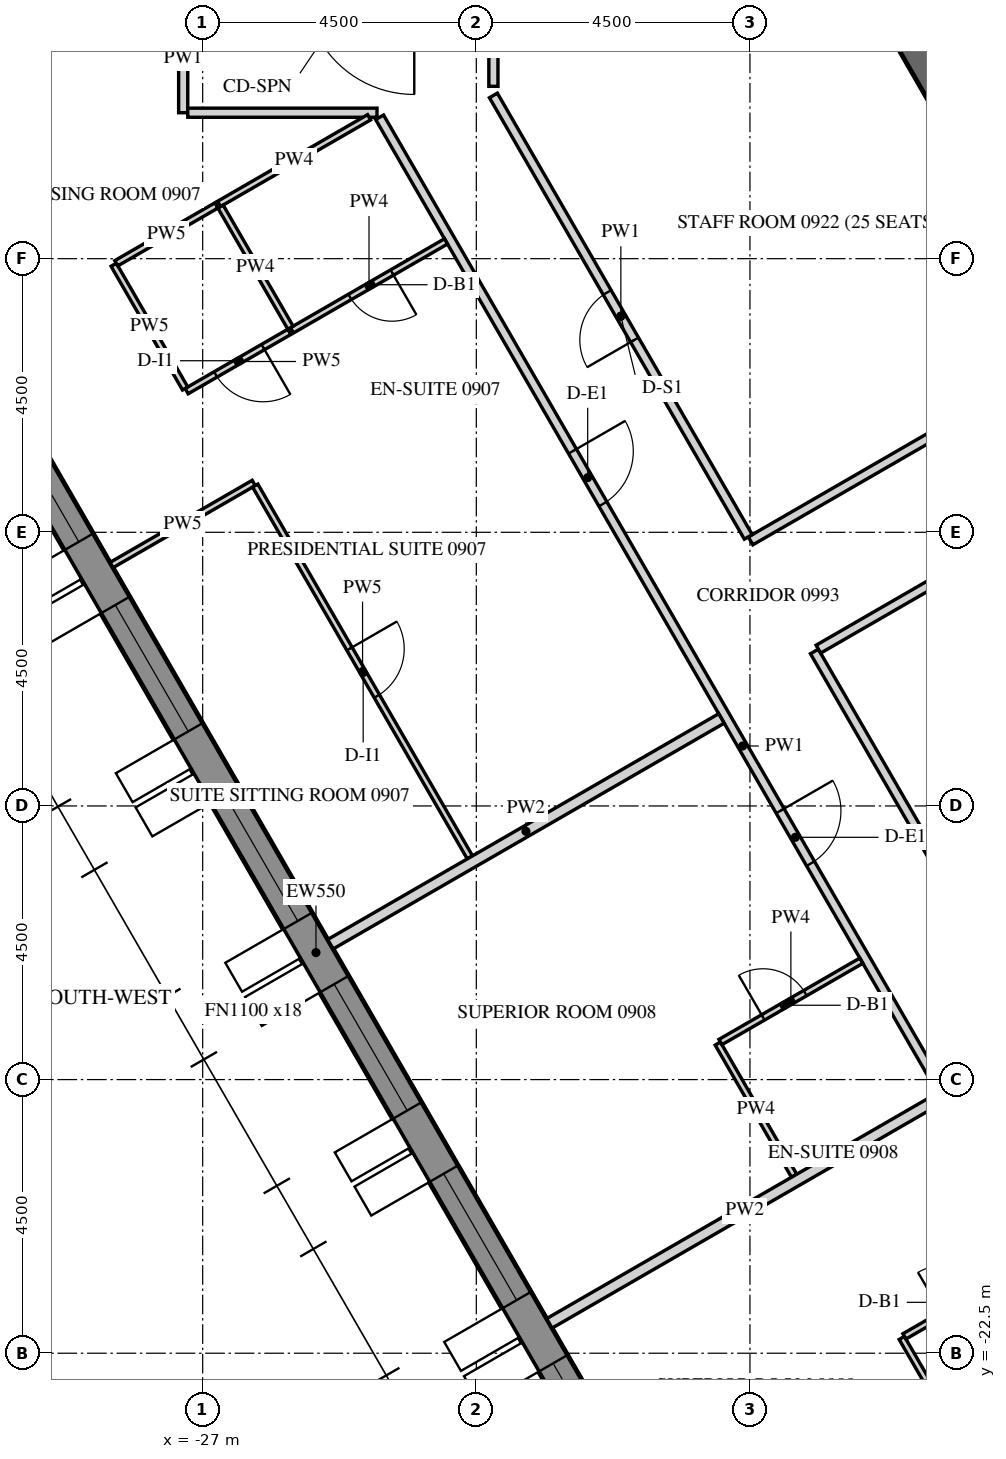
"""IFC4 building model, lengths in metres.
Left out: names, types, materials, properties, quantities, classifications, styles, units other than length and angle.
Written with IfcOpenShell. Run it as: python <this file> out.ifc"""

import sys

from ifc_helpers import new_model, si_unit, direction, frame, frame_2d, origin, place, context, subcontext, project, spatial, polyline, rectangle, outline, extrude, element, fill, save


model = new_model("IFC4")
c1 = context("Model", 3, precision=1e-05, world=origin(), true_north=direction((0.0, 1.0)))
c2 = subcontext(c1, "Body", "Model", "MODEL_VIEW")
j1 = project(units=[si_unit("LENGTHUNIT", "METRE"), si_unit("PLANEANGLEUNIT", "RADIAN")], contexts=[c1])
p1 = place(None, origin())
s1 = spatial("IfcSite", under=j1, at=p1, CompositionType="ELEMENT")
p2 = place(p1, origin())
s2 = spatial("IfcBuilding", under=s1, at=p2, CompositionType="ELEMENT")
p3 = place(p2, frame((0.0, 0.0, 123.3)))
s3 = spatial("IfcBuildingStorey", under=s2, at=p3, CompositionType="ELEMENT", Elevation=123.3)
p4 = place(p3, frame((-32.655, -2.89, -0.15), z_axis=(0.0, 0.0, 1.0), x_axis=(0.499997711317, -0.866026725152, 0.0)))
e1 = element("IfcWall", 1, at=p4, inside=s3, PredefinedType="SOLIDWALL", context=c2, shape_type="SweptSolid", body=[
    extrude(outline(polyline([(-0.022, -0.275), (30.097, -0.275), (30.045, 0.275), (0.022, 0.275), (-0.022, -0.275)])), origin(), (0.0, 0.0, 1.0), 3.9),
])
p5 = place(p4, frame((1.236, 0.0, 1.05)))
e2 = element("IfcOpeningElement", 2, at=p5, cuts=e1, PredefinedType="OPENING", context=c2, shape_type="SweptSolid", body=[
    extrude(rectangle(XDim=2.4, YDim=2.4, at=frame_2d((1.2, 1.2))), frame((0.0, 0.285, 0.0), z_axis=(0.0, -1.0, 0.0), x_axis=(1.0, 0.0, 0.0)), (0.0, 0.0, 1.0), 0.57),
])
p6 = place(p4, frame((4.835, 0.0, 1.05)))
e3 = element("IfcOpeningElement", 3, at=p6, cuts=e1, PredefinedType="OPENING", context=c2, shape_type="SweptSolid", body=[
    extrude(rectangle(XDim=2.4, YDim=2.4, at=frame_2d((1.2, 1.2))), frame((0.0, 0.285, 0.0), z_axis=(0.0, -1.0, 0.0), x_axis=(1.0, 0.0, 0.0)), (0.0, 0.0, 1.0), 0.57),
])
p7 = place(p4, frame((8.436, 0.0, 1.05)))
e4 = element("IfcOpeningElement", 4, at=p7, cuts=e1, PredefinedType="OPENING", context=c2, shape_type="SweptSolid", body=[
    extrude(rectangle(XDim=2.4, YDim=2.4, at=frame_2d((1.2, 1.2))), frame((0.0, 0.285, 0.0), z_axis=(0.0, -1.0, 0.0), x_axis=(1.0, 0.0, 0.0)), (0.0, 0.0, 1.0), 0.57),
])
p8 = place(p4, frame((12.035, 0.0, 1.05)))
e5 = element("IfcOpeningElement", 5, at=p8, cuts=e1, PredefinedType="OPENING", context=c2, shape_type="SweptSolid", body=[
    extrude(rectangle(XDim=2.4, YDim=2.4, at=frame_2d((1.2, 1.2))), frame((0.0, 0.285, 0.0), z_axis=(0.0, -1.0, 0.0), x_axis=(1.0, 0.0, 0.0)), (0.0, 0.0, 1.0), 0.57),
])
p9 = place(p4, frame((15.635, 0.0, 1.05)))
e6 = element("IfcOpeningElement", 6, at=p9, cuts=e1, PredefinedType="OPENING", context=c2, shape_type="SweptSolid", body=[
    extrude(rectangle(XDim=2.4, YDim=2.4, at=frame_2d((1.2, 1.2))), frame((0.0, 0.285, 0.0), z_axis=(0.0, -1.0, 0.0), x_axis=(1.0, 0.0, 0.0)), (0.0, 0.0, 1.0), 0.57),
])
p10 = place(p4, frame((19.236, 0.0, 1.05)))
e7 = element("IfcOpeningElement", 7, at=p10, cuts=e1, PredefinedType="OPENING", context=c2, shape_type="SweptSolid", body=[
    extrude(rectangle(XDim=2.4, YDim=2.4, at=frame_2d((1.2, 1.2))), frame((0.0, 0.285, 0.0), z_axis=(0.0, -1.0, 0.0), x_axis=(1.0, 0.0, 0.0)), (0.0, 0.0, 1.0), 0.57),
])
p11 = place(p4, frame((22.835, 0.0, 1.05)))
e8 = element("IfcOpeningElement", 8, at=p11, cuts=e1, PredefinedType="OPENING", context=c2, shape_type="SweptSolid", body=[
    extrude(rectangle(XDim=2.4, YDim=2.4, at=frame_2d((1.2, 1.2))), frame((0.0, 0.285, 0.0), z_axis=(0.0, -1.0, 0.0), x_axis=(1.0, 0.0, 0.0)), (0.0, 0.0, 1.0), 0.57),
])
p12 = place(p4, frame((26.436, 0.0, 1.05)))
e9 = element("IfcOpeningElement", 9, at=p12, cuts=e1, PredefinedType="OPENING", context=c2, shape_type="SweptSolid", body=[
    extrude(rectangle(XDim=2.4, YDim=2.4, at=frame_2d((1.2, 1.2))), frame((0.0, 0.285, 0.0), z_axis=(0.0, -1.0, 0.0), x_axis=(1.0, 0.0, 0.0)), (0.0, 0.0, 1.0), 0.57),
])
p13 = place(p3, frame((-15.819, 0.0, -0.15), z_axis=(0.0, 0.0, 1.0), x_axis=(0.499999880136, -0.866025472988, 0.0)))
e10 = element("IfcWall", 10, at=p13, inside=s3, PredefinedType="SHEAR", context=c2, shape_type="SweptSolid", body=[
    extrude(outline(polyline([(-0.173, -0.3), (15.993, -0.3), (15.646, 0.3), (0.173, 0.3), (-0.173, -0.3)])), origin(), (0.0, 0.0, 1.0), 3.9),
])
p14 = place(p13, frame((6.981, 0.0, 0.15)))
e11 = element("IfcOpeningElement", 11, at=p14, cuts=e10, PredefinedType="OPENING", context=c2, shape_type="SweptSolid", body=[
    extrude(rectangle(XDim=1.8, YDim=2.4, at=frame_2d((0.9, 1.2))), frame((0.0, 0.31, 0.0), z_axis=(0.0, -1.0, 0.0), x_axis=(1.0, 0.0, 0.0)), (0.0, 0.0, 1.0), 0.62),
])
p15 = place(p3, frame((-27.32, -0.3, 0.0), z_axis=(0.0, 0.0, 1.0), x_axis=(0.0, -1.0, 0.0)))
e12 = element("IfcWall", 12, at=p15, inside=s3, PredefinedType="PARTITIONING", context=c2, shape_type="SweptSolid", body=[
    extrude(rectangle(XDim=1.8, YDim=0.15, at=frame_2d((0.9, 0.0))), origin(), (0.0, 0.0, 1.0), 2.988),
])
p16 = place(p3, frame((-27.245, -2.1, 0.0), z_axis=(0.0, 0.0, 1.0), x_axis=(1.0, 0.0, 0.0)))
e13 = element("IfcWall", 13, at=p16, inside=s3, PredefinedType="PARTITIONING", context=c2, shape_type="SweptSolid", body=[
    extrude(rectangle(XDim=3.112, YDim=0.15, at=frame_2d((1.556, 0.0))), origin(), (0.0, 0.0, 1.0), 2.988),
])
p17 = place(p3, frame((-24.09, -2.175, 0.0), z_axis=(0.0, 0.0, 1.0), x_axis=(0.499996832073, -0.86602723278, 0.0)))
e14 = element("IfcWall", 14, at=p17, inside=s3, PredefinedType="PARTITIONING", context=c2, shape_type="SweptSolid", body=[
    extrude(rectangle(XDim=23.877, YDim=0.15, at=frame_2d((11.938, 0.0))), origin(), (0.0, 0.0, 1.0), 2.988),
])
p18 = place(p17, frame((6.343, 0.0, 0.0)))
e15 = element("IfcOpeningElement", 15, at=p18, cuts=e14, PredefinedType="OPENING", context=c2, shape_type="SweptSolid", body=[
    extrude(rectangle(XDim=1.0, YDim=2.1, at=frame_2d((0.5, 1.05))), frame((0.0, 0.085, 0.0), z_axis=(0.0, -1.0, 0.0), x_axis=(1.0, 0.0, 0.0)), (0.0, 0.0, 1.0), 0.17),
])
p19 = place(p17, frame((13.172, 0.0, 0.0)))
e16 = element("IfcOpeningElement", 16, at=p19, cuts=e14, PredefinedType="OPENING", context=c2, shape_type="SweptSolid", body=[
    extrude(rectangle(XDim=1.0, YDim=2.1, at=frame_2d((0.5, 1.05))), frame((0.0, 0.085, 0.0), z_axis=(0.0, -1.0, 0.0), x_axis=(1.0, 0.0, 0.0)), (0.0, 0.0, 1.0), 0.17),
])
p20 = place(p17, frame((19.625, 0.0, 0.0)))
e17 = element("IfcOpeningElement", 17, at=p20, cuts=e14, PredefinedType="OPENING", context=c2, shape_type="SweptSolid", body=[
    extrude(rectangle(XDim=1.0, YDim=2.1, at=frame_2d((0.5, 1.05))), frame((0.0, 0.085, 0.0), z_axis=(0.0, -1.0, 0.0), x_axis=(1.0, 0.0, 0.0)), (0.0, 0.0, 1.0), 0.17),
])
p21 = place(p3, frame((-12.664, -6.066, 0.0), z_axis=(0.0, 0.0, 1.0), x_axis=(-0.866023618125, -0.500003092839, 0.0)))
e18 = element("IfcWall", 18, at=p21, inside=s3, PredefinedType="PARTITIONING", context=c2, shape_type="SweptSolid", body=[
    extrude(rectangle(XDim=6.15, YDim=0.15, at=frame_2d((3.075, 0.0))), origin(), (0.0, 0.0, 1.0), 2.988),
])
p22 = place(p3, frame((-18.027, -9.076, 0.0), z_axis=(0.0, 0.0, 1.0), x_axis=(-0.500007318041, 0.86602117867, 0.0)))
e19 = element("IfcWall", 19, at=p22, inside=s3, PredefinedType="PARTITIONING", context=c2, shape_type="SweptSolid", body=[
    extrude(rectangle(XDim=8.383, YDim=0.15, at=frame_2d((4.191, 0.0))), origin(), (0.0, 0.0, 1.0), 2.988),
])
p23 = place(p22, frame((3.742, 0.0, 0.0)))
e20 = element("IfcOpeningElement", 20, at=p23, cuts=e19, PredefinedType="OPENING", context=c2, shape_type="SweptSolid", body=[
    extrude(rectangle(XDim=0.9, YDim=2.1, at=frame_2d((0.45, 1.05))), frame((0.0, 0.085, 0.0), z_axis=(0.0, -1.0, 0.0), x_axis=(1.0, 0.0, 0.0)), (0.0, 0.0, 1.0), 0.17),
])
p24 = place(p3, frame((-22.219, -1.666, 0.0), z_axis=(0.0, 0.0, 1.0), x_axis=(0.0, 1.0, 0.0)))
e21 = element("IfcWall", 21, at=p24, inside=s3, PredefinedType="PARTITIONING", context=c2, shape_type="SweptSolid", body=[
    extrude(rectangle(XDim=1.366, YDim=0.15, at=frame_2d((0.683, 0.0))), origin(), (0.0, 0.0, 1.0), 2.988),
])
p25 = place(p3, frame((-11.197, -20.907, 0.0), z_axis=(0.0, 0.0, 1.0), x_axis=(-0.500004557924, 0.86602277225, 0.0)))
e22 = element("IfcWall", 22, at=p25, inside=s3, PredefinedType="PARTITIONING", context=c2, shape_type="SweptSolid", body=[
    extrude(rectangle(XDim=11.487, YDim=0.15, at=frame_2d((5.743, 0.0))), origin(), (0.0, 0.0, 1.0), 2.988),
])
p26 = place(p25, frame((5.293, 0.0, 0.0)))
e23 = element("IfcOpeningElement", 23, at=p26, cuts=e22, PredefinedType="OPENING", context=c2, shape_type="SweptSolid", body=[
    extrude(rectangle(XDim=0.9, YDim=2.1, at=frame_2d((0.45, 1.05))), frame((0.0, 0.085, 0.0), z_axis=(0.0, -1.0, 0.0), x_axis=(1.0, 0.0, 0.0)), (0.0, 0.0, 1.0), 0.17),
])
p27 = place(p3, frame((-16.875, -10.922, 0.0), z_axis=(0.0, 0.0, 1.0), x_axis=(0.866023634079, 0.500003065207, 0.0)))
e24 = element("IfcWall", 24, at=p27, inside=s3, PredefinedType="PARTITIONING", context=c2, shape_type="SweptSolid", body=[
    extrude(rectangle(XDim=6.075, YDim=0.15, at=frame_2d((3.038, 0.0))), origin(), (0.0, 0.0, 1.0), 2.988),
])
p28 = place(p3, frame((-26.731, -3.6, 0.0), z_axis=(0.0, 0.0, 1.0), x_axis=(0.866004402611, 0.500036373335, 0.0)))
e25 = element("IfcWall", 25, at=p28, inside=s3, PredefinedType="PARTITIONING", context=c2, shape_type="SweptSolid", body=[
    extrude(rectangle(XDim=2.85, YDim=0.1, at=frame_2d((1.425, 0.0))), origin(), (0.0, 0.0, 1.0), 2.988),
])
p29 = place(p3, frame((-22.998, -4.216, 0.0), z_axis=(0.0, 0.0, 1.0), x_axis=(-0.866025730634, -0.499999433879, 0.0)))
e26 = element("IfcWall", 26, at=p29, inside=s3, PredefinedType="PARTITIONING", context=c2, shape_type="SweptSolid", body=[
    extrude(rectangle(XDim=2.925, YDim=0.1, at=frame_2d((1.462, 0.0))), origin(), (0.0, 0.0, 1.0), 2.988),
])
p30 = place(p29, frame((1.025, 0.0, 0.0)))
e27 = element("IfcOpeningElement", 27, at=p30, cuts=e26, PredefinedType="OPENING", context=c2, shape_type="SweptSolid", body=[
    extrude(rectangle(XDim=0.8, YDim=2.1, at=frame_2d((0.4, 1.05))), frame((0.0, 0.06, 0.0), z_axis=(0.0, -1.0, 0.0), x_axis=(1.0, 0.0, 0.0)), (0.0, 0.0, 1.0), 0.12),
])
p31 = place(p3, frame((-25.575, -5.703, 0.0), z_axis=(0.0, 0.0, 1.0), x_axis=(-0.866000020948, -0.500043961785, 0.0)))
e28 = element("IfcWall", 28, at=p31, inside=s3, PredefinedType="PARTITIONING", context=c2, shape_type="SweptSolid", body=[
    extrude(rectangle(XDim=1.95, YDim=0.1, at=frame_2d((0.975, 0.0))), origin(), (0.0, 0.0, 1.0), 2.988),
])
p32 = place(p31, frame((0.5, 0.0, 0.0)))
e29 = element("IfcOpeningElement", 29, at=p32, cuts=e28, PredefinedType="OPENING", context=c2, shape_type="SweptSolid", body=[
    extrude(rectangle(XDim=0.9, YDim=2.1, at=frame_2d((0.45, 1.05))), frame((0.0, 0.06, 0.0), z_axis=(0.0, -1.0, 0.0), x_axis=(1.0, 0.0, 0.0)), (0.0, 0.0, 1.0), 0.12),
])
p33 = place(p3, frame((-27.288, -6.635, 0.0), z_axis=(0.0, 0.0, 1.0), x_axis=(-0.500016218704, 0.866016039709, 0.0)))
e30 = element("IfcWall", 30, at=p33, inside=s3, PredefinedType="PARTITIONING", context=c2, shape_type="SweptSolid", body=[
    extrude(rectangle(XDim=2.35, YDim=0.1, at=frame_2d((1.175, 0.0))), origin(), (0.0, 0.0, 1.0), 2.988),
])
p34 = place(p3, frame((-28.42, -4.575, 0.0), z_axis=(0.0, 0.0, 1.0), x_axis=(0.866044365799, 0.499967155389, 0.0)))
e31 = element("IfcWall", 31, at=p34, inside=s3, PredefinedType="PARTITIONING", context=c2, shape_type="SweptSolid", body=[
    extrude(rectangle(XDim=1.9, YDim=0.1, at=frame_2d((0.95, 0.0))), origin(), (0.0, 0.0, 1.0), 2.988),
])
p35 = place(p3, frame((-28.499, -9.538, 0.0), z_axis=(0.0, 0.0, 1.0), x_axis=(0.866059108428, 0.4999416173, 0.0)))
e32 = element("IfcWall", 32, at=p35, inside=s3, PredefinedType="PARTITIONING", context=c2, shape_type="SweptSolid", body=[
    extrude(rectangle(XDim=2.7, YDim=0.1, at=frame_2d((1.35, 0.0))), origin(), (0.0, 0.0, 1.0), 2.988),
])
p36 = place(p3, frame((-26.136, -8.232, 0.0), z_axis=(0.0, 0.0, 1.0), x_axis=(0.499995846692, -0.866027801685, 0.0)))
e33 = element("IfcWall", 33, at=p36, inside=s3, PredefinedType="PARTITIONING", context=c2, shape_type="SweptSolid", body=[
    extrude(rectangle(XDim=7.06, YDim=0.1, at=frame_2d((3.53, 0.0))), origin(), (0.0, 0.0, 1.0), 2.988),
])
p37 = place(p36, frame((3.1, 0.0, 0.0)))
e34 = element("IfcOpeningElement", 34, at=p37, cuts=e33, PredefinedType="OPENING", context=c2, shape_type="SweptSolid", body=[
    extrude(rectangle(XDim=0.9, YDim=2.1, at=frame_2d((0.45, 1.05))), frame((0.0, 0.06, 0.0), z_axis=(0.0, -1.0, 0.0), x_axis=(1.0, 0.0, 0.0)), (0.0, 0.0, 1.0), 0.12),
])
p38 = place(p3, frame((-24.899, -15.774, 0.0), z_axis=(0.0, 0.0, 1.0), x_axis=(0.866028983062, 0.499993800457, 0.0)))
e35 = element("IfcWall", 35, at=p38, inside=s3, PredefinedType="PARTITIONING", context=c2, shape_type="SweptSolid", body=[
    extrude(rectangle(XDim=7.425, YDim=0.18, at=frame_2d((3.712, 0.0))), origin(), (0.0, 0.0, 1.0), 2.988),
])
p39 = place(p3, frame((-26.706, -3.643, 0.0), z_axis=(0.0, 0.0, 1.0), x_axis=(0.499952165731, -0.866053019151, 0.0)))
e36 = element("IfcWall", 36, at=p39, inside=s3, PredefinedType="PARTITIONING", context=c2, shape_type="SweptSolid", body=[
    extrude(rectangle(XDim=2.3, YDim=0.1, at=frame_2d((1.15, 0.0))), origin(), (0.0, 0.0, 1.0), 2.988),
])
p40 = place(p3, frame((-17.274, -19.581, 0.0), z_axis=(0.0, 0.0, 1.0), x_axis=(-0.499946979623, 0.86605601295, 0.0)))
e37 = element("IfcWall", 37, at=p40, inside=s3, PredefinedType="PARTITIONING", context=c2, shape_type="SweptSolid", body=[
    extrude(rectangle(XDim=2.51, YDim=0.1, at=frame_2d((1.255, 0.0))), origin(), (0.0, 0.0, 1.0), 2.988),
])
p41 = place(p3, frame((-18.485, -17.383, 0.0), z_axis=(0.0, 0.0, 1.0), x_axis=(0.866004723184, 0.50003581814, 0.0)))
e38 = element("IfcWall", 38, at=p41, inside=s3, PredefinedType="PARTITIONING", context=c2, shape_type="SweptSolid", body=[
    extrude(rectangle(XDim=2.675, YDim=0.1, at=frame_2d((1.337, 0.0))), origin(), (0.0, 0.0, 1.0), 2.988),
])
p42 = place(p41, frame((0.81, 0.0, 0.0)))
e39 = element("IfcOpeningElement", 39, at=p42, cuts=e38, PredefinedType="OPENING", context=c2, shape_type="SweptSolid", body=[
    extrude(rectangle(XDim=0.8, YDim=2.1, at=frame_2d((0.4, 1.05))), frame((0.0, 0.06, 0.0), z_axis=(0.0, -1.0, 0.0), x_axis=(1.0, 0.0, 0.0)), (0.0, 0.0, 1.0), 0.12),
])
p43 = place(p3, frame((-21.299, -22.009, 0.0), z_axis=(0.0, 0.0, 1.0), x_axis=(0.866014745021, 0.500018461065, 0.0)))
e40 = element("IfcWall", 40, at=p43, inside=s3, PredefinedType="PARTITIONING", context=c2, shape_type="SweptSolid", body=[
    extrude(rectangle(XDim=7.425, YDim=0.18, at=frame_2d((3.712, 0.0))), origin(), (0.0, 0.0, 1.0), 2.988),
])
p44 = place(p3, frame((-14.428, -24.11, 0.0), z_axis=(0.0, 0.0, 1.0), x_axis=(-0.499961633463, 0.866047553582, 0.0)))
e41 = element("IfcWall", 41, at=p44, inside=s3, PredefinedType="PARTITIONING", context=c2, shape_type="SweptSolid", body=[
    extrude(rectangle(XDim=2.15, YDim=0.1, at=frame_2d((1.075, 0.0))), origin(), (0.0, 0.0, 1.0), 2.988),
])
p45 = place(p3, frame((-15.46, -22.223, 0.0), z_axis=(0.0, 0.0, 1.0), x_axis=(0.866031185235, 0.4999899861, 0.0)))
e42 = element("IfcWall", 42, at=p45, inside=s3, PredefinedType="PARTITIONING", context=c2, shape_type="SweptSolid", body=[
    extrude(rectangle(XDim=2.475, YDim=0.1, at=frame_2d((1.238, 0.0))), origin(), (0.0, 0.0, 1.0), 2.988),
])
p46 = place(p45, frame((0.72, 0.0, 0.0)))
e43 = element("IfcOpeningElement", 43, at=p46, cuts=e42, PredefinedType="OPENING", context=c2, shape_type="SweptSolid", body=[
    extrude(rectangle(XDim=0.8, YDim=2.1, at=frame_2d((0.4, 1.05))), frame((0.0, 0.06, 0.0), z_axis=(0.0, -1.0, 0.0), x_axis=(1.0, 0.0, 0.0)), (0.0, 0.0, 1.0), 0.12),
])
p47 = place(p3, frame((-15.983, -30.059, 0.0), z_axis=(0.0, 0.0, 1.0), x_axis=(0.469476547643, 0.882944942346, 0.0)))
e44 = element("IfcWall", 44, at=p47, inside=s3, PredefinedType="PARTITIONING", context=c2, shape_type="SweptSolid", body=[
    extrude(rectangle(XDim=8.073, YDim=0.18, at=frame_2d((4.037, 0.0))), origin(), (0.0, 0.0, 1.0), 2.988),
])
p48 = place(p6, frame((0.0, 0.205, 0.0)))
e45 = element("IfcWindow", 45, at=p48, inside=s3, PartitioningType="DOUBLE_PANEL_VERTICAL", PredefinedType="WINDOW", context=c2, shape_type="SweptSolid", body=[
    extrude(rectangle(XDim=2.4, YDim=2.4, at=frame_2d((1.2, 1.2))), frame((0.0, 0.03, 0.0), z_axis=(0.0, -1.0, 0.0), x_axis=(1.0, 0.0, 0.0)), (0.0, 0.0, 1.0), 0.06),
])
fill(e3, e45)
p49 = place(p7, frame((0.0, 0.205, 0.0)))
e46 = element("IfcWindow", 46, at=p49, inside=s3, PartitioningType="DOUBLE_PANEL_VERTICAL", PredefinedType="WINDOW", context=c2, shape_type="SweptSolid", body=[
    extrude(rectangle(XDim=2.4, YDim=2.4, at=frame_2d((1.2, 1.2))), frame((0.0, 0.03, 0.0), z_axis=(0.0, -1.0, 0.0), x_axis=(1.0, 0.0, 0.0)), (0.0, 0.0, 1.0), 0.06),
])
fill(e4, e46)
p50 = place(p8, frame((0.0, 0.205, 0.0)))
e47 = element("IfcWindow", 47, at=p50, inside=s3, PartitioningType="DOUBLE_PANEL_VERTICAL", PredefinedType="WINDOW", context=c2, shape_type="SweptSolid", body=[
    extrude(rectangle(XDim=2.4, YDim=2.4, at=frame_2d((1.2, 1.2))), frame((0.0, 0.03, 0.0), z_axis=(0.0, -1.0, 0.0), x_axis=(1.0, 0.0, 0.0)), (0.0, 0.0, 1.0), 0.06),
])
fill(e5, e47)
p51 = place(p9, frame((0.0, 0.205, 0.0)))
e48 = element("IfcWindow", 48, at=p51, inside=s3, PartitioningType="DOUBLE_PANEL_VERTICAL", PredefinedType="WINDOW", context=c2, shape_type="SweptSolid", body=[
    extrude(rectangle(XDim=2.4, YDim=2.4, at=frame_2d((1.2, 1.2))), frame((0.0, 0.03, 0.0), z_axis=(0.0, -1.0, 0.0), x_axis=(1.0, 0.0, 0.0)), (0.0, 0.0, 1.0), 0.06),
])
fill(e6, e48)
p52 = place(p10, frame((0.0, 0.205, 0.0)))
e49 = element("IfcWindow", 49, at=p52, inside=s3, PartitioningType="DOUBLE_PANEL_VERTICAL", PredefinedType="WINDOW", context=c2, shape_type="SweptSolid", body=[
    extrude(rectangle(XDim=2.4, YDim=2.4, at=frame_2d((1.2, 1.2))), frame((0.0, 0.03, 0.0), z_axis=(0.0, -1.0, 0.0), x_axis=(1.0, 0.0, 0.0)), (0.0, 0.0, 1.0), 0.06),
])
fill(e7, e49)
p53 = place(p11, frame((0.0, 0.205, 0.0)))
e50 = element("IfcWindow", 50, at=p53, inside=s3, PartitioningType="DOUBLE_PANEL_VERTICAL", PredefinedType="WINDOW", context=c2, shape_type="SweptSolid", body=[
    extrude(rectangle(XDim=2.4, YDim=2.4, at=frame_2d((1.2, 1.2))), frame((0.0, 0.03, 0.0), z_axis=(0.0, -1.0, 0.0), x_axis=(1.0, 0.0, 0.0)), (0.0, 0.0, 1.0), 0.06),
])
fill(e8, e50)
p54 = place(p18, origin())
e51 = element("IfcDoor", 51, at=p54, inside=s3, OperationType="SINGLE_SWING_LEFT", PredefinedType="DOOR", context=c2, shape_type="SweptSolid", body=[
    extrude(rectangle(XDim=1.0, YDim=2.1, at=frame_2d((0.5, 1.05))), frame((0.0, 0.025, 0.0), z_axis=(0.0, -1.0, 0.0), x_axis=(1.0, 0.0, 0.0)), (0.0, 0.0, 1.0), 0.05),
])
fill(e15, e51)
p55 = place(p30, origin())
e52 = element("IfcDoor", 52, at=p55, inside=s3, OperationType="SINGLE_SWING_RIGHT", PredefinedType="DOOR", context=c2, shape_type="SweptSolid", body=[
    extrude(rectangle(XDim=0.8, YDim=2.1, at=frame_2d((0.4, 1.05))), frame((0.0, 0.025, 0.0), z_axis=(0.0, -1.0, 0.0), x_axis=(1.0, 0.0, 0.0)), (0.0, 0.0, 1.0), 0.05),
])
fill(e27, e52)
p56 = place(p32, origin())
e53 = element("IfcDoor", 53, at=p56, inside=s3, OperationType="SINGLE_SWING_RIGHT", PredefinedType="DOOR", context=c2, shape_type="SweptSolid", body=[
    extrude(rectangle(XDim=0.9, YDim=2.1, at=frame_2d((0.45, 1.05))), frame((0.0, 0.025, 0.0), z_axis=(0.0, -1.0, 0.0), x_axis=(1.0, 0.0, 0.0)), (0.0, 0.0, 1.0), 0.05),
])
fill(e29, e53)
p57 = place(p37, origin())
e54 = element("IfcDoor", 54, at=p57, inside=s3, OperationType="SINGLE_SWING_RIGHT", PredefinedType="DOOR", context=c2, shape_type="SweptSolid", body=[
    extrude(rectangle(XDim=0.9, YDim=2.1, at=frame_2d((0.45, 1.05))), frame((0.0, 0.025, 0.0), z_axis=(0.0, -1.0, 0.0), x_axis=(1.0, 0.0, 0.0)), (0.0, 0.0, 1.0), 0.05),
])
fill(e34, e54)
p58 = place(p19, origin())
e55 = element("IfcDoor", 55, at=p58, inside=s3, OperationType="SINGLE_SWING_LEFT", PredefinedType="DOOR", context=c2, shape_type="SweptSolid", body=[
    extrude(rectangle(XDim=1.0, YDim=2.1, at=frame_2d((0.5, 1.05))), frame((0.0, 0.025, 0.0), z_axis=(0.0, -1.0, 0.0), x_axis=(1.0, 0.0, 0.0)), (0.0, 0.0, 1.0), 0.05),
])
fill(e16, e55)
p59 = place(p42, origin())
e56 = element("IfcDoor", 56, at=p59, inside=s3, OperationType="SINGLE_SWING_RIGHT", PredefinedType="DOOR", context=c2, shape_type="SweptSolid", body=[
    extrude(rectangle(XDim=0.8, YDim=2.1, at=frame_2d((0.4, 1.05))), frame((0.0, 0.025, 0.0), z_axis=(0.0, -1.0, 0.0), x_axis=(1.0, 0.0, 0.0)), (0.0, 0.0, 1.0), 0.05),
])
fill(e39, e56)
p60 = place(p23, origin())
e57 = element("IfcDoor", 57, at=p60, inside=s3, OperationType="SINGLE_SWING_RIGHT", PredefinedType="DOOR", context=c2, shape_type="SweptSolid", body=[
    extrude(rectangle(XDim=0.9, YDim=2.1, at=frame_2d((0.45, 1.05))), frame((0.0, 0.025, 0.0), z_axis=(0.0, -1.0, 0.0), x_axis=(1.0, 0.0, 0.0)), (0.0, 0.0, 1.0), 0.05),
])
fill(e20, e57)
save(model, sys.argv[1])
